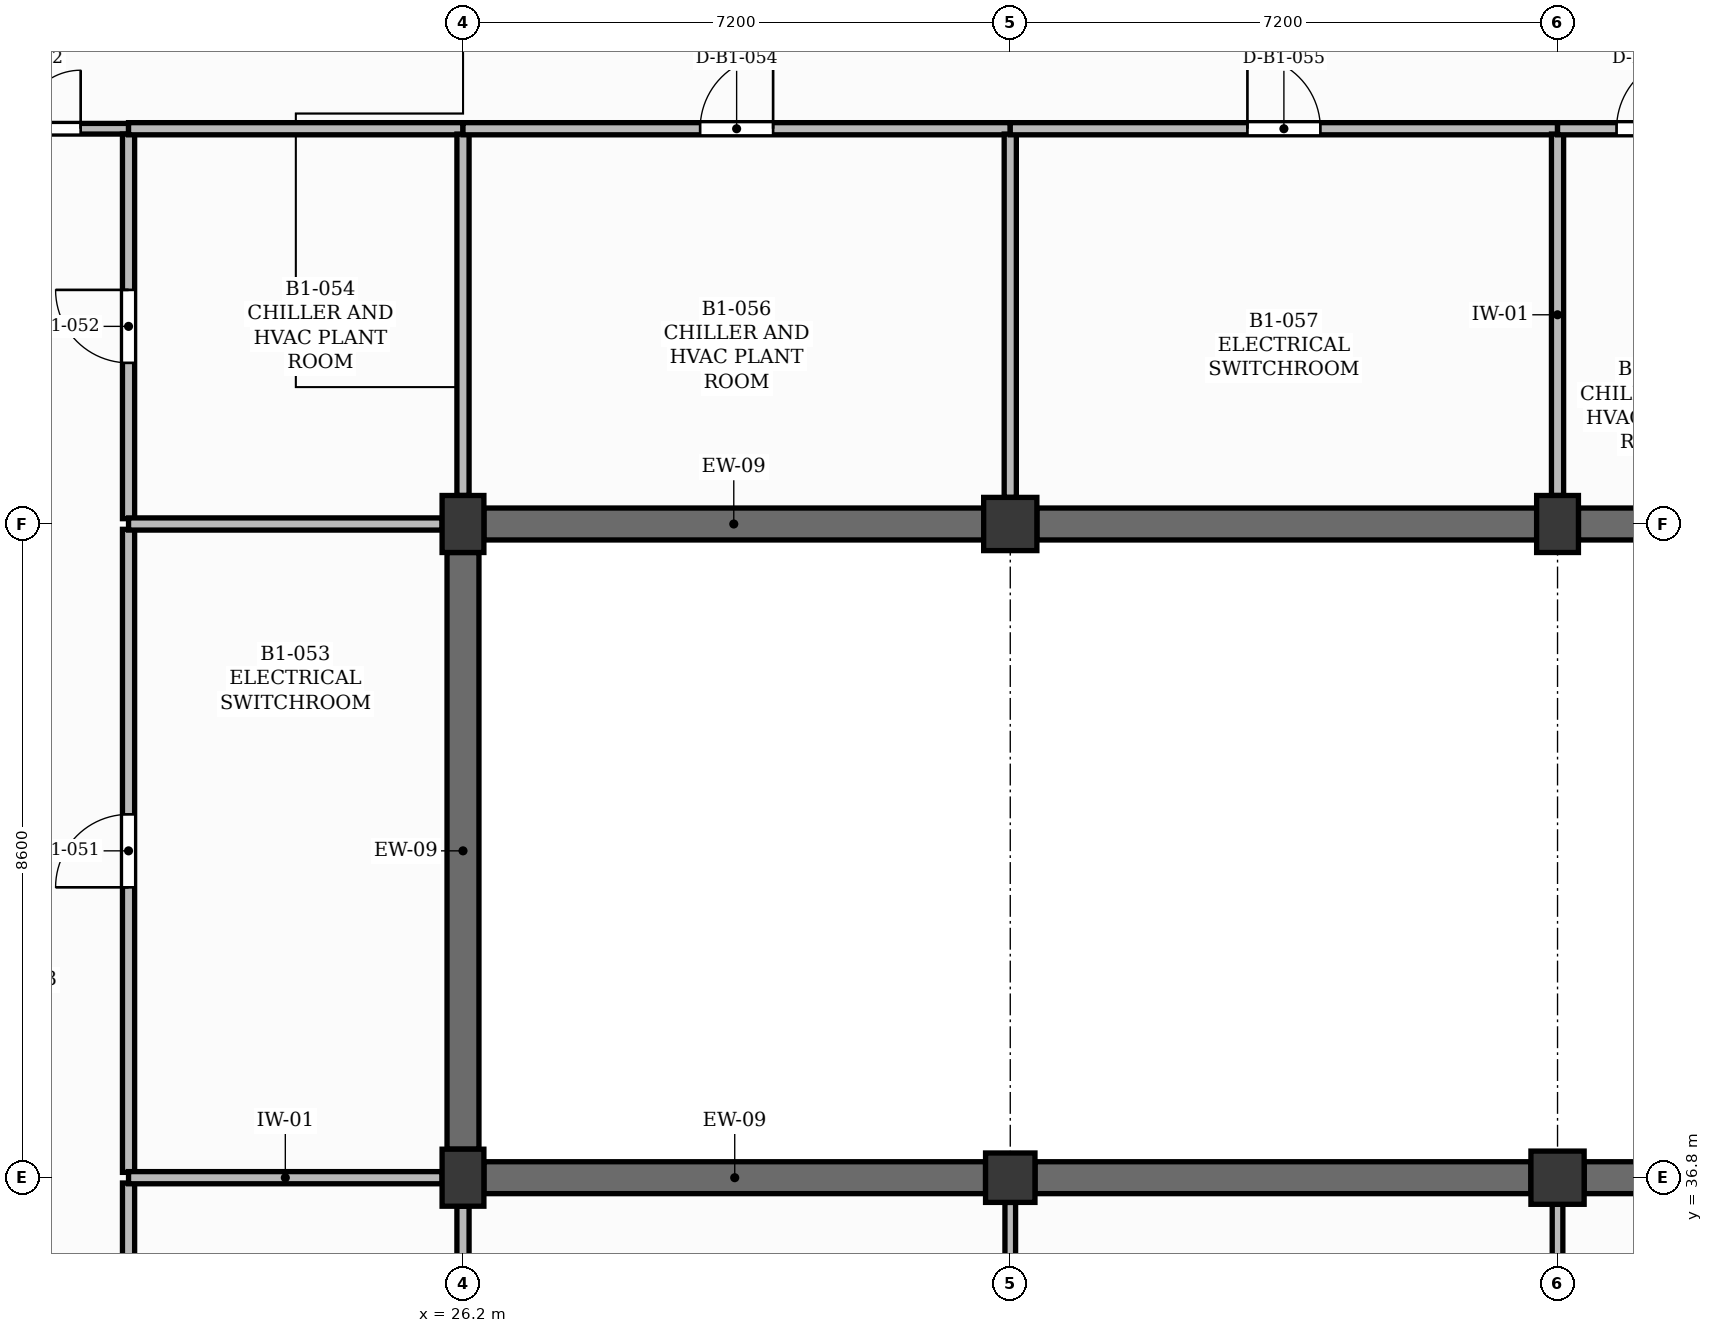
"""IFC4 building model, lengths in metres.
Left out: names, types, materials, properties, quantities, classifications, styles, units other than length and angle.
Written with IfcOpenShell. Run it as: python <this file> out.ifc"""

import sys

from ifc_helpers import new_model, si_unit, direction, frame, frame_2d, origin, origin_2d, place, context, subcontext, project, spatial, rectangle, extrude, element, fill, save


model = new_model("IFC4")
c1 = context("Model", 3, precision=1e-05, world=origin(), true_north=direction((0.0, 1.0)))
c2 = subcontext(c1, "Body", "Model", "MODEL_VIEW")
j1 = project(units=[si_unit("LENGTHUNIT", "METRE"), si_unit("PLANEANGLEUNIT", "RADIAN")], contexts=[c1])
p1 = place(None, origin())
s1 = spatial("IfcSite", under=j1, at=p1, CompositionType="ELEMENT")
p2 = place(p1, origin())
s2 = spatial("IfcBuilding", under=s1, at=p2, CompositionType="ELEMENT")
p3 = place(p2, frame((0.0, 0.0, -4.5)))
s3 = spatial("IfcBuildingStorey", under=s2, at=p3, CompositionType="ELEMENT", Elevation=-4.5)
for number, where, z_axis, x_axis in (
    (1, (26.2, 36.8, 0.0), (0.0, 0.0, 1.0), (1.0, 0.0, 0.0)),
    (2, (26.2, 45.4, 0.0), (0.0, 0.0, 1.0), (1.0, 0.0, 0.0)),
):
    element("IfcColumn", number, at=place(p3, frame(where, z_axis=z_axis, x_axis=x_axis)), inside=s3, PredefinedType="COLUMN", context=c2, shape_type="SweptSolid", body=[
        extrude(rectangle(XDim=0.55, YDim=0.75, at=origin_2d()), origin(), (0.0, 0.0, 1.0), 4.2),
    ])
p4 = place(p3, frame((33.4, 36.8, 0.0), z_axis=(0.0, 0.0, 1.0), x_axis=(1.0, 0.0, 0.0)))
e3 = element("IfcColumn", 3, at=p4, inside=s3, PredefinedType="COLUMN", context=c2, shape_type="SweptSolid", body=[
    extrude(rectangle(XDim=0.65, YDim=0.65, at=origin_2d()), origin(), (0.0, 0.0, 1.0), 4.2),
])
for number, where, z_axis, x_axis in (
    (4, (33.4, 45.4, 0.0), (0.0, 0.0, 1.0), (1.0, 0.0, 0.0)),
    (5, (40.6, 36.8, 0.0), (0.0, 0.0, 1.0), (1.0, 0.0, 0.0)),
):
    element("IfcColumn", number, at=place(p3, frame(where, z_axis=z_axis, x_axis=x_axis)), inside=s3, PredefinedType="COLUMN", context=c2, shape_type="SweptSolid", body=[
        extrude(rectangle(XDim=0.7, YDim=0.7, at=origin_2d()), origin(), (0.0, 0.0, 1.0), 4.2),
    ])
p5 = place(p3, frame((40.6, 45.4, 0.0), z_axis=(0.0, 0.0, 1.0), x_axis=(1.0, 0.0, 0.0)))
e6 = element("IfcColumn", 6, at=p5, inside=s3, PredefinedType="COLUMN", context=c2, shape_type="SweptSolid", body=[
    extrude(rectangle(XDim=0.55, YDim=0.75, at=origin_2d()), origin(), (0.0, 0.0, 1.0), 4.2),
])
p6 = place(p3, frame((26.2, 37.175, 0.0), z_axis=(0.0, 0.0, 1.0), x_axis=(0.0, 1.0, 0.0)))
e7 = element("IfcWall", 7, at=p6, inside=s3, PredefinedType="USERDEFINED", context=c2, shape_type="SweptSolid", body=[
    extrude(rectangle(XDim=7.85, YDim=0.42, at=frame_2d((3.925, 0.0))), origin(), (0.0, 0.0, 1.0), 4.2),
])
p7 = place(p3, frame((26.475, 36.8, 0.0), z_axis=(0.0, 0.0, 1.0), x_axis=(1.0, 0.0, 0.0)))
e8 = element("IfcWall", 8, at=p7, inside=s3, PredefinedType="USERDEFINED", context=c2, shape_type="SweptSolid", body=[
    extrude(rectangle(XDim=6.6, YDim=0.42, at=frame_2d((3.3, 0.0))), origin(), (0.0, 0.0, 1.0), 4.2),
])
p8 = place(p3, frame((26.475, 45.4, 0.0), z_axis=(0.0, 0.0, 1.0), x_axis=(1.0, 0.0, 0.0)))
e9 = element("IfcWall", 9, at=p8, inside=s3, PredefinedType="USERDEFINED", context=c2, shape_type="SweptSolid", body=[
    extrude(rectangle(XDim=6.575, YDim=0.42, at=frame_2d((3.288, 0.0))), origin(), (0.0, 0.0, 1.0), 4.2),
])
p9 = place(p3, frame((33.725, 36.8, 0.0), z_axis=(0.0, 0.0, 1.0), x_axis=(1.0, 0.0, 0.0)))
e10 = element("IfcWall", 10, at=p9, inside=s3, PredefinedType="USERDEFINED", context=c2, shape_type="SweptSolid", body=[
    extrude(rectangle(XDim=6.525, YDim=0.42, at=frame_2d((3.262, 0.0))), origin(), (0.0, 0.0, 1.0), 4.2),
])
p10 = place(p3, frame((33.75, 45.4, 0.0), z_axis=(0.0, 0.0, 1.0), x_axis=(1.0, 0.0, 0.0)))
e11 = element("IfcWall", 11, at=p10, inside=s3, PredefinedType="USERDEFINED", context=c2, shape_type="SweptSolid", body=[
    extrude(rectangle(XDim=6.575, YDim=0.42, at=frame_2d((3.288, 0.0))), origin(), (0.0, 0.0, 1.0), 4.2),
])
p11 = place(p3, frame((40.95, 36.8, 0.0), z_axis=(0.0, 0.0, 1.0), x_axis=(1.0, 0.0, 0.0)))
e12 = element("IfcWall", 12, at=p11, inside=s3, PredefinedType="USERDEFINED", context=c2, shape_type="SweptSolid", body=[
    extrude(rectangle(XDim=6.525, YDim=0.42, at=frame_2d((3.263, 0.0))), origin(), (0.0, 0.0, 1.0), 4.2),
])
p12 = place(p3, frame((40.875, 45.4, 0.0), z_axis=(0.0, 0.0, 1.0), x_axis=(1.0, 0.0, 0.0)))
e13 = element("IfcWall", 13, at=p12, inside=s3, PredefinedType="USERDEFINED", context=c2, shape_type="SweptSolid", body=[
    extrude(rectangle(XDim=6.6, YDim=0.42, at=frame_2d((3.3, 0.0))), origin(), (0.0, 0.0, 1.0), 4.2),
])
p13 = place(p3, frame((19.0, 50.6, 0.0), z_axis=(0.0, 0.0, 1.0), x_axis=(1.0, 0.0, 0.0)))
e14 = element("IfcWall", 14, at=p13, inside=s3, PredefinedType="PARTITIONING", context=c2, shape_type="SweptSolid", body=[
    extrude(rectangle(XDim=2.8, YDim=0.14, at=frame_2d((1.4, 0.0))), origin(), (0.0, 0.0, 1.0), 4.08),
])
p14 = place(p13, frame((0.63, 0.0, 0.0)))
e15 = element("IfcOpeningElement", 15, at=p14, cuts=e14, PredefinedType="OPENING", context=c2, shape_type="SweptSolid", body=[
    extrude(rectangle(XDim=1.54, YDim=2.25, at=frame_2d((0.77, 1.125))), frame((0.0, 0.08, 0.0), z_axis=(0.0, -1.0, 0.0), x_axis=(1.0, 0.0, 0.0)), (0.0, 0.0, 1.0), 0.16),
])
p15 = place(p3, frame((21.8, 33.47, 0.0), z_axis=(0.0, 0.0, 1.0), x_axis=(0.0, 1.0, 0.0)))
e16 = element("IfcWall", 16, at=p15, inside=s3, PredefinedType="PARTITIONING", context=c2, shape_type="SweptSolid", body=[
    extrude(rectangle(XDim=3.26, YDim=0.16, at=frame_2d((1.63, 0.0))), origin(), (0.0, 0.0, 1.0), 4.08),
])
p16 = place(p15, frame((1.15, 0.0, 0.0)))
e17 = element("IfcOpeningElement", 17, at=p16, cuts=e16, PredefinedType="OPENING", context=c2, shape_type="SweptSolid", body=[
    extrude(rectangle(XDim=0.96, YDim=2.1, at=frame_2d((0.48, 1.05))), frame((0.0, 0.09, 0.0), z_axis=(0.0, -1.0, 0.0), x_axis=(1.0, 0.0, 0.0)), (0.0, 0.0, 1.0), 0.18),
])
p17 = place(p3, frame((21.8, 36.87, 0.0), z_axis=(0.0, 0.0, 1.0), x_axis=(0.0, 1.0, 0.0)))
e18 = element("IfcWall", 18, at=p17, inside=s3, PredefinedType="PARTITIONING", context=c2, shape_type="SweptSolid", body=[
    extrude(rectangle(XDim=8.46, YDim=0.16, at=frame_2d((4.23, 0.0))), origin(), (0.0, 0.0, 1.0), 4.08),
])
p18 = place(p17, frame((3.75, 0.0, 0.0)))
e19 = element("IfcOpeningElement", 19, at=p18, cuts=e18, PredefinedType="OPENING", context=c2, shape_type="SweptSolid", body=[
    extrude(rectangle(XDim=0.96, YDim=2.1, at=frame_2d((0.48, 1.05))), frame((0.0, 0.09, 0.0), z_axis=(0.0, -1.0, 0.0), x_axis=(1.0, 0.0, 0.0)), (0.0, 0.0, 1.0), 0.18),
])
p19 = place(p3, frame((21.8, 36.8, 0.0), z_axis=(0.0, 0.0, 1.0), x_axis=(1.0, 0.0, 0.0)))
e20 = element("IfcWall", 20, at=p19, inside=s3, PredefinedType="PARTITIONING", context=c2, shape_type="SweptSolid", body=[
    extrude(rectangle(XDim=4.125, YDim=0.16, at=frame_2d((2.062, 0.0))), origin(), (0.0, 0.0, 1.0), 3.5),
])
p20 = place(p3, frame((21.8, 45.47, 0.0), z_axis=(0.0, 0.0, 1.0), x_axis=(0.0, 1.0, 0.0)))
e21 = element("IfcWall", 21, at=p20, inside=s3, PredefinedType="PARTITIONING", context=c2, shape_type="SweptSolid", body=[
    extrude(rectangle(XDim=5.06, YDim=0.16, at=frame_2d((2.53, 0.0))), origin(), (0.0, 0.0, 1.0), 4.08),
])
p21 = place(p20, frame((2.05, 0.0, 0.0)))
e22 = element("IfcOpeningElement", 22, at=p21, cuts=e21, PredefinedType="OPENING", context=c2, shape_type="SweptSolid", body=[
    extrude(rectangle(XDim=0.96, YDim=2.1, at=frame_2d((0.48, 1.05))), frame((0.0, 0.09, 0.0), z_axis=(0.0, -1.0, 0.0), x_axis=(1.0, 0.0, 0.0)), (0.0, 0.0, 1.0), 0.18),
])
p22 = place(p3, frame((21.8, 45.4, 0.0), z_axis=(0.0, 0.0, 1.0), x_axis=(1.0, 0.0, 0.0)))
e23 = element("IfcWall", 23, at=p22, inside=s3, PredefinedType="PARTITIONING", context=c2, shape_type="SweptSolid", body=[
    extrude(rectangle(XDim=4.125, YDim=0.16, at=frame_2d((2.062, 0.0))), origin(), (0.0, 0.0, 1.0), 3.6),
])
p23 = place(p3, frame((21.8, 50.6, 0.0), z_axis=(0.0, 0.0, 1.0), x_axis=(1.0, 0.0, 0.0)))
e24 = element("IfcWall", 24, at=p23, inside=s3, PredefinedType="PARTITIONING", context=c2, shape_type="SweptSolid", body=[
    extrude(rectangle(XDim=4.4, YDim=0.16, at=frame_2d((2.2, 0.0))), origin(), (0.0, 0.0, 1.0), 4.08),
])
p24 = place(p3, frame((26.2, 33.47, 0.0), z_axis=(0.0, 0.0, 1.0), x_axis=(0.0, 1.0, 0.0)))
e25 = element("IfcWall", 25, at=p24, inside=s3, PredefinedType="PARTITIONING", context=c2, shape_type="SweptSolid", body=[
    extrude(rectangle(XDim=2.955, YDim=0.16, at=frame_2d((1.478, 0.0))), origin(), (0.0, 0.0, 1.0), 3.4),
])
p25 = place(p3, frame((26.2, 45.775, 0.0), z_axis=(0.0, 0.0, 1.0), x_axis=(0.0, 1.0, 0.0)))
e26 = element("IfcWall", 26, at=p25, inside=s3, PredefinedType="PARTITIONING", context=c2, shape_type="SweptSolid", body=[
    extrude(rectangle(XDim=4.755, YDim=0.16, at=frame_2d((2.377, 0.0))), origin(), (0.0, 0.0, 1.0), 3.5),
])
p26 = place(p3, frame((26.2, 50.6, 0.0), z_axis=(0.0, 0.0, 1.0), x_axis=(1.0, 0.0, 0.0)))
e27 = element("IfcWall", 27, at=p26, inside=s3, PredefinedType="PARTITIONING", context=c2, shape_type="SweptSolid", body=[
    extrude(rectangle(XDim=7.2, YDim=0.16, at=frame_2d((3.6, 0.0))), origin(), (0.0, 0.0, 1.0), 4.08),
])
p27 = place(p26, frame((3.12, 0.0, 0.0)))
e28 = element("IfcOpeningElement", 28, at=p27, cuts=e27, PredefinedType="OPENING", context=c2, shape_type="SweptSolid", body=[
    extrude(rectangle(XDim=0.96, YDim=2.1, at=frame_2d((0.48, 1.05))), frame((0.0, 0.09, 0.0), z_axis=(0.0, -1.0, 0.0), x_axis=(1.0, 0.0, 0.0)), (0.0, 0.0, 1.0), 0.18),
])
p28 = place(p3, frame((33.4, 33.47, 0.0), z_axis=(0.0, 0.0, 1.0), x_axis=(0.0, 1.0, 0.0)))
e29 = element("IfcWall", 29, at=p28, inside=s3, PredefinedType="PARTITIONING", context=c2, shape_type="SweptSolid", body=[
    extrude(rectangle(XDim=3.005, YDim=0.14, at=frame_2d((1.502, 0.0))), origin(), (0.0, 0.0, 1.0), 3.4),
])
p29 = place(p3, frame((33.4, 45.75, 0.0), z_axis=(0.0, 0.0, 1.0), x_axis=(0.0, 1.0, 0.0)))
e30 = element("IfcWall", 30, at=p29, inside=s3, PredefinedType="PARTITIONING", context=c2, shape_type="SweptSolid", body=[
    extrude(rectangle(XDim=4.78, YDim=0.16, at=frame_2d((2.39, 0.0))), origin(), (0.0, 0.0, 1.0), 3.5),
])
p30 = place(p3, frame((33.4, 50.6, 0.0), z_axis=(0.0, 0.0, 1.0), x_axis=(1.0, 0.0, 0.0)))
e31 = element("IfcWall", 31, at=p30, inside=s3, PredefinedType="PARTITIONING", context=c2, shape_type="SweptSolid", body=[
    extrude(rectangle(XDim=7.2, YDim=0.16, at=frame_2d((3.6, 0.0))), origin(), (0.0, 0.0, 1.0), 4.08),
])
p31 = place(p30, frame((3.12, 0.0, 0.0)))
e32 = element("IfcOpeningElement", 32, at=p31, cuts=e31, PredefinedType="OPENING", context=c2, shape_type="SweptSolid", body=[
    extrude(rectangle(XDim=0.96, YDim=2.1, at=frame_2d((0.48, 1.05))), frame((0.0, 0.09, 0.0), z_axis=(0.0, -1.0, 0.0), x_axis=(1.0, 0.0, 0.0)), (0.0, 0.0, 1.0), 0.18),
])
p32 = place(p3, frame((40.6, 33.47, 0.0), z_axis=(0.0, 0.0, 1.0), x_axis=(0.0, 1.0, 0.0)))
e33 = element("IfcWall", 33, at=p32, inside=s3, PredefinedType="PARTITIONING", context=c2, shape_type="SweptSolid", body=[
    extrude(rectangle(XDim=2.98, YDim=0.14, at=frame_2d((1.49, 0.0))), origin(), (0.0, 0.0, 1.0), 3.4),
])
p33 = place(p3, frame((40.6, 45.775, 0.0), z_axis=(0.0, 0.0, 1.0), x_axis=(0.0, 1.0, 0.0)))
e34 = element("IfcWall", 34, at=p33, inside=s3, PredefinedType="PARTITIONING", context=c2, shape_type="SweptSolid", body=[
    extrude(rectangle(XDim=4.755, YDim=0.16, at=frame_2d((2.377, 0.0))), origin(), (0.0, 0.0, 1.0), 3.5),
])
p34 = place(p3, frame((40.6, 50.6, 0.0), z_axis=(0.0, 0.0, 1.0), x_axis=(1.0, 0.0, 0.0)))
e35 = element("IfcWall", 35, at=p34, inside=s3, PredefinedType="PARTITIONING", context=c2, shape_type="SweptSolid", body=[
    extrude(rectangle(XDim=2.513, YDim=0.16, at=frame_2d((1.256, 0.0))), origin(), (0.0, 0.0, 1.0), 4.08),
])
p35 = place(p34, frame((0.777, 0.0, 0.0)))
e36 = element("IfcOpeningElement", 36, at=p35, cuts=e35, PredefinedType="OPENING", context=c2, shape_type="SweptSolid", body=[
    extrude(rectangle(XDim=0.96, YDim=2.1, at=frame_2d((0.48, 1.05))), frame((0.0, 0.09, 0.0), z_axis=(0.0, -1.0, 0.0), x_axis=(1.0, 0.0, 0.0)), (0.0, 0.0, 1.0), 0.18),
])
p36 = place(p14, origin())
e37 = element("IfcDoor", 37, at=p36, inside=s3, OperationType="DOUBLE_DOOR_SINGLE_SWING", PredefinedType="DOOR", context=c2, shape_type="SweptSolid", body=[
    extrude(rectangle(XDim=1.54, YDim=2.25, at=frame_2d((0.77, 1.125))), frame((0.0, 0.025, 0.0), z_axis=(0.0, -1.0, 0.0), x_axis=(1.0, 0.0, 0.0)), (0.0, 0.0, 1.0), 0.05),
])
fill(e15, e37)
p37 = place(p18, origin())
e38 = element("IfcDoor", 38, at=p37, inside=s3, OperationType="SINGLE_SWING_LEFT", PredefinedType="DOOR", context=c2, shape_type="SweptSolid", body=[
    extrude(rectangle(XDim=0.96, YDim=2.1, at=frame_2d((0.48, 1.05))), frame((0.0, 0.025, 0.0), z_axis=(0.0, -1.0, 0.0), x_axis=(1.0, 0.0, 0.0)), (0.0, 0.0, 1.0), 0.05),
])
fill(e19, e38)
p38 = place(p21, origin())
e39 = element("IfcDoor", 39, at=p38, inside=s3, OperationType="SINGLE_SWING_RIGHT", PredefinedType="DOOR", context=c2, shape_type="SweptSolid", body=[
    extrude(rectangle(XDim=0.96, YDim=2.1, at=frame_2d((0.48, 1.05))), frame((0.0, 0.025, 0.0), z_axis=(0.0, -1.0, 0.0), x_axis=(1.0, 0.0, 0.0)), (0.0, 0.0, 1.0), 0.05),
])
fill(e22, e39)
p39 = place(p27, origin())
e40 = element("IfcDoor", 40, at=p39, inside=s3, OperationType="SINGLE_SWING_RIGHT", PredefinedType="DOOR", context=c2, shape_type="SweptSolid", body=[
    extrude(rectangle(XDim=0.96, YDim=2.1, at=frame_2d((0.48, 1.05))), frame((0.0, 0.025, 0.0), z_axis=(0.0, -1.0, 0.0), x_axis=(1.0, 0.0, 0.0)), (0.0, 0.0, 1.0), 0.05),
])
fill(e28, e40)
p40 = place(p31, origin())
e41 = element("IfcDoor", 41, at=p40, inside=s3, OperationType="SINGLE_SWING_LEFT", PredefinedType="DOOR", context=c2, shape_type="SweptSolid", body=[
    extrude(rectangle(XDim=0.96, YDim=2.1, at=frame_2d((0.48, 1.05))), frame((0.0, 0.025, 0.0), z_axis=(0.0, -1.0, 0.0), x_axis=(1.0, 0.0, 0.0)), (0.0, 0.0, 1.0), 0.05),
])
fill(e32, e41)
p41 = place(p35, origin())
e42 = element("IfcDoor", 42, at=p41, inside=s3, OperationType="SINGLE_SWING_RIGHT", PredefinedType="DOOR", context=c2, shape_type="SweptSolid", body=[
    extrude(rectangle(XDim=0.96, YDim=2.1, at=frame_2d((0.48, 1.05))), frame((0.0, 0.025, 0.0), z_axis=(0.0, -1.0, 0.0), x_axis=(1.0, 0.0, 0.0)), (0.0, 0.0, 1.0), 0.05),
])
fill(e36, e42)
save(model, sys.argv[1])
